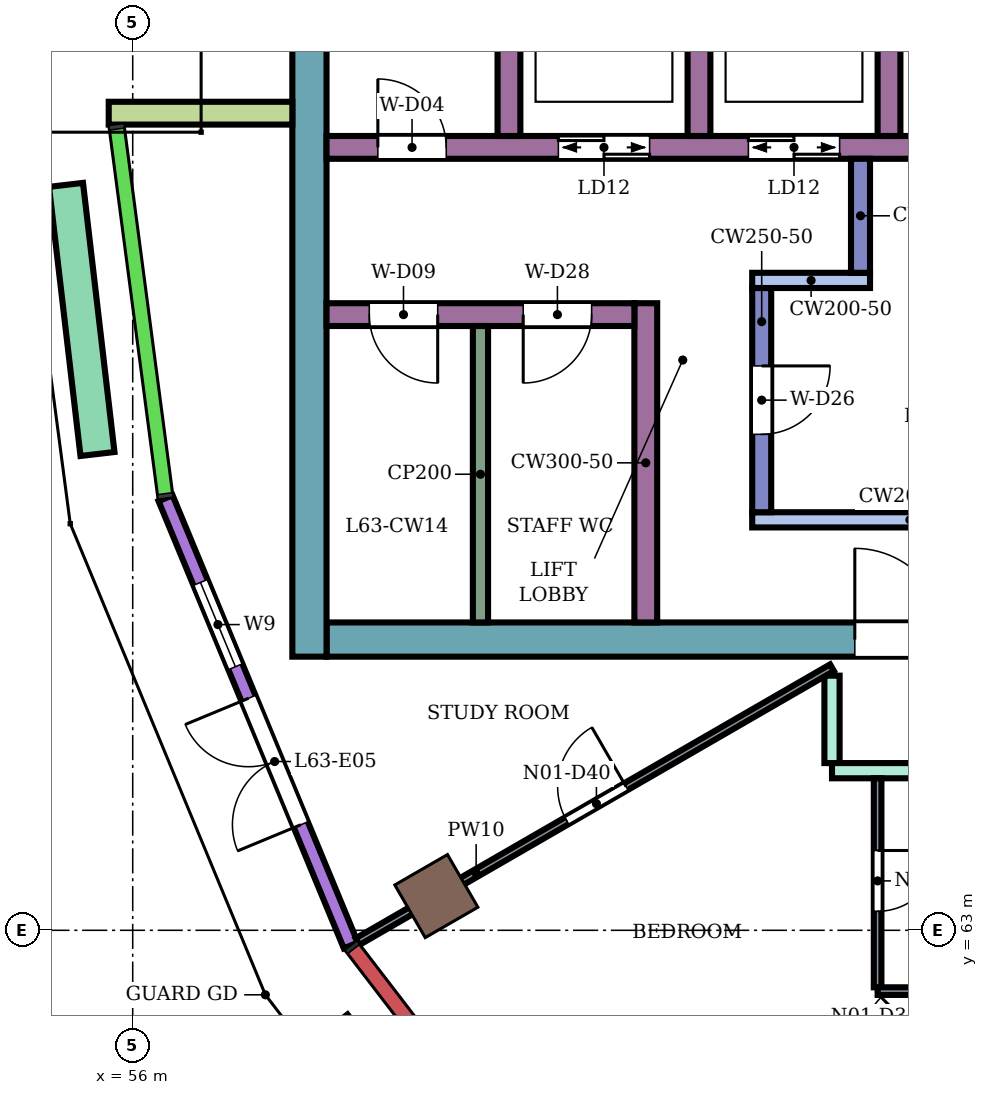
"""IFC4 building model, lengths in metres.
Left out: names, types, materials, properties, quantities, classifications, styles, units other than length and angle.
Written with IfcOpenShell. Run it as: python <this file> out.ifc"""

import sys

from ifc_helpers import new_model, si_unit, direction, frame, frame_2d, origin, origin_2d, place, context, subcontext, project, spatial, rectangle, extrude, element, fill, save


model = new_model("IFC4")
c1 = context("Model", 3, precision=1e-05, world=origin(), true_north=direction((0.0, 1.0)))
c2 = subcontext(c1, "Body", "Model", "MODEL_VIEW")
j1 = project(units=[si_unit("LENGTHUNIT", "METRE"), si_unit("PLANEANGLEUNIT", "RADIAN")], contexts=[c1])
p1 = place(None, origin())
s1 = spatial("IfcSite", under=j1, at=p1, CompositionType="ELEMENT")
p2 = place(p1, origin())
s2 = spatial("IfcBuilding", under=s1, at=p2, CompositionType="ELEMENT")
p3 = place(p2, frame((0.0, 0.0, 275.7)))
s3 = spatial("IfcBuildingStorey", under=s2, at=p3, CompositionType="ELEMENT", Elevation=275.7)
p4 = place(p3, frame((59.995, 63.45, 0.0), z_axis=(0.0, 0.0, 1.0), x_axis=(-0.866025403784, -0.5, 0.0)))
e1 = element("IfcColumn", 1, at=p4, inside=s3, PredefinedType="COLUMN", context=c2, shape_type="SweptSolid", body=[
    extrude(rectangle(XDim=0.8, YDim=0.8, at=origin_2d()), origin(), (0.0, 0.0, 1.0), 4.2),
])
p5 = place(p3, frame((72.1, 66.825, 0.0), z_axis=(0.0, 0.0, 1.0), x_axis=(-1.0, 0.0, 0.0)))
e2 = element("IfcWall", 2, at=p5, inside=s3, PredefinedType="SHEAR", context=c2, shape_type="SweptSolid", body=[
    extrude(rectangle(XDim=13.55, YDim=0.45, at=frame_2d((6.775, 0.0))), origin(), (0.0, 0.0, 1.0), 3.88),
])
p6 = place(p5, frame((4.2, 0.0, 0.0)))
e3 = element("IfcOpeningElement", 3, at=p6, cuts=e2, PredefinedType="OPENING", context=c2, shape_type="SweptSolid", body=[
    extrude(rectangle(XDim=2.4, YDim=2.4, at=frame_2d((1.2, 1.2))), frame((0.0, 0.235, 0.0), z_axis=(0.0, -1.0, 0.0), x_axis=(1.0, 0.0, 0.0)), (0.0, 0.0, 1.0), 0.47),
])
p7 = place(p3, frame((58.325, 83.4, 0.0), z_axis=(0.0, 0.0, 1.0), x_axis=(0.0, -1.0, 0.0)))
e4 = element("IfcWall", 4, at=p7, inside=s3, PredefinedType="SHEAR", context=c2, shape_type="SweptSolid", body=[
    extrude(rectangle(XDim=16.8, YDim=0.45, at=frame_2d((8.4, 0.0))), origin(), (0.0, 0.0, 1.0), 3.88),
])
p8 = place(p3, frame((68.3, 73.3, 0.0), z_axis=(0.0, 0.0, 1.0), x_axis=(-1.0, 0.0, 0.0)))
e5 = element("IfcWall", 5, at=p8, inside=s3, PredefinedType="SHEAR", context=c2, shape_type="SweptSolid", body=[
    extrude(rectangle(XDim=9.75, YDim=0.3, at=frame_2d((4.875, 0.0))), origin(), (0.0, 0.0, 1.0), 3.88),
])
p9 = place(p8, frame((0.55, 0.0, 0.0)))
e6 = element("IfcOpeningElement", 6, at=p9, cuts=e5, PredefinedType="OPENING", context=c2, shape_type="SweptSolid", body=[
    extrude(rectangle(XDim=1.1, YDim=2.1, at=frame_2d((0.55, 1.05))), frame((0.0, 0.16, 0.0), z_axis=(0.0, -1.0, 0.0), x_axis=(1.0, 0.0, 0.0)), (0.0, 0.0, 1.0), 0.32),
])
p10 = place(p8, frame((3.0, 0.0, 0.0)))
e7 = element("IfcOpeningElement", 7, at=p10, cuts=e5, PredefinedType="OPENING", context=c2, shape_type="SweptSolid", body=[
    extrude(rectangle(XDim=1.2, YDim=2.1, at=frame_2d((0.6, 1.05))), frame((0.0, 0.16, 0.0), z_axis=(0.0, -1.0, 0.0), x_axis=(1.0, 0.0, 0.0)), (0.0, 0.0, 1.0), 0.32),
])
p11 = place(p8, frame((5.5, 0.0, 0.0)))
e8 = element("IfcOpeningElement", 8, at=p11, cuts=e5, PredefinedType="OPENING", context=c2, shape_type="SweptSolid", body=[
    extrude(rectangle(XDim=1.2, YDim=2.1, at=frame_2d((0.6, 1.05))), frame((0.0, 0.16, 0.0), z_axis=(0.0, -1.0, 0.0), x_axis=(1.0, 0.0, 0.0)), (0.0, 0.0, 1.0), 0.32),
])
p12 = place(p8, frame((8.175, 0.0, 0.0)))
e9 = element("IfcOpeningElement", 9, at=p12, cuts=e5, PredefinedType="OPENING", context=c2, shape_type="SweptSolid", body=[
    extrude(rectangle(XDim=0.9, YDim=2.1, at=frame_2d((0.45, 1.05))), frame((0.0, 0.16, 0.0), z_axis=(0.0, -1.0, 0.0), x_axis=(1.0, 0.0, 0.0)), (0.0, 0.0, 1.0), 0.32),
])
for number, where, z_axis, x_axis in (
    (10, (65.95, 76.0, 0.0), (0.0, 0.0, 1.0), (0.0, -1.0, 0.0)),
    (11, (63.45, 76.0, 0.0), (0.0, 0.0, 1.0), (0.0, -1.0, 0.0)),
    (12, (60.95, 76.0, 0.0), (0.0, 0.0, 1.0), (0.0, -1.0, 0.0)),
):
    element("IfcWall", number, at=place(p3, frame(where, z_axis=z_axis, x_axis=x_axis)), inside=s3, PredefinedType="SHEAR", context=c2, shape_type="SweptSolid", body=[
        extrude(rectangle(XDim=2.55, YDim=0.3, at=frame_2d((1.275, 0.0))), origin(), (0.0, 0.0, 1.0), 3.88),
    ])
p13 = place(p3, frame((68.3, 68.4, 0.0), z_axis=(0.0, 0.0, 1.0), x_axis=(-1.0, 0.0, 0.0)))
e13 = element("IfcWall", 13, at=p13, inside=s3, PredefinedType="SHEAR", context=c2, shape_type="SweptSolid", body=[
    extrude(rectangle(XDim=4.15, YDim=0.2, at=frame_2d((2.075, 0.0))), origin(), (0.0, 0.0, 1.0), 3.88),
])
p14 = place(p3, frame((64.275, 71.45, 0.0), z_axis=(0.0, 0.0, 1.0), x_axis=(0.0, -1.0, 0.0)))
e14 = element("IfcWall", 14, at=p14, inside=s3, PredefinedType="SHEAR", context=c2, shape_type="SweptSolid", body=[
    extrude(rectangle(XDim=2.95, YDim=0.25, at=frame_2d((1.475, 0.0))), origin(), (0.0, 0.0, 1.0), 3.88),
])
p15 = place(p14, frame((1.025, 0.0, 0.0)))
e15 = element("IfcOpeningElement", 15, at=p15, cuts=e14, PredefinedType="OPENING", context=c2, shape_type="SweptSolid", body=[
    extrude(rectangle(XDim=0.9, YDim=2.1, at=frame_2d((0.45, 1.05))), frame((0.0, 0.135, 0.0), z_axis=(0.0, -1.0, 0.0), x_axis=(1.0, 0.0, 0.0)), (0.0, 0.0, 1.0), 0.27),
])
p16 = place(p3, frame((65.7, 71.55, 0.0), z_axis=(0.0, 0.0, 1.0), x_axis=(-1.0, 0.0, 0.0)))
e16 = element("IfcWall", 16, at=p16, inside=s3, PredefinedType="SHEAR", context=c2, shape_type="SweptSolid", body=[
    extrude(rectangle(XDim=1.55, YDim=0.2, at=frame_2d((0.775, 0.0))), origin(), (0.0, 0.0, 1.0), 3.88),
])
p17 = place(p3, frame((65.575, 73.15, 0.0), z_axis=(0.0, 0.0, 1.0), x_axis=(0.0, -1.0, 0.0)))
e17 = element("IfcWall", 17, at=p17, inside=s3, PredefinedType="SHEAR", context=c2, shape_type="SweptSolid", body=[
    extrude(rectangle(XDim=1.5, YDim=0.25, at=frame_2d((0.75, 0.0))), origin(), (0.0, 0.0, 1.0), 3.88),
])
p18 = place(p3, frame((62.75, 71.25, 0.0), z_axis=(0.0, 0.0, 1.0), x_axis=(0.0, -1.0, 0.0)))
e18 = element("IfcWall", 18, at=p18, inside=s3, PredefinedType="SHEAR", context=c2, shape_type="SweptSolid", body=[
    extrude(rectangle(XDim=4.2, YDim=0.3, at=frame_2d((2.1, 0.0))), origin(), (0.0, 0.0, 1.0), 3.88),
])
p19 = place(p3, frame((62.6, 71.1, 0.0), z_axis=(0.0, 0.0, 1.0), x_axis=(-1.0, 0.0, 0.0)))
e19 = element("IfcWall", 19, at=p19, inside=s3, PredefinedType="SHEAR", context=c2, shape_type="SweptSolid", body=[
    extrude(rectangle(XDim=4.05, YDim=0.3, at=frame_2d((2.025, 0.0))), origin(), (0.0, 0.0, 1.0), 3.88),
])
p20 = place(p19, frame((0.562, 0.0, 0.0)))
e20 = element("IfcOpeningElement", 20, at=p20, cuts=e19, PredefinedType="OPENING", context=c2, shape_type="SweptSolid", body=[
    extrude(rectangle(XDim=0.9, YDim=2.1, at=frame_2d((0.45, 1.05))), frame((0.0, 0.16, 0.0), z_axis=(0.0, -1.0, 0.0), x_axis=(1.0, 0.0, 0.0)), (0.0, 0.0, 1.0), 0.32),
])
p21 = place(p19, frame((2.587, 0.0, 0.0)))
e21 = element("IfcOpeningElement", 21, at=p21, cuts=e19, PredefinedType="OPENING", context=c2, shape_type="SweptSolid", body=[
    extrude(rectangle(XDim=0.9, YDim=2.1, at=frame_2d((0.45, 1.05))), frame((0.0, 0.16, 0.0), z_axis=(0.0, -1.0, 0.0), x_axis=(1.0, 0.0, 0.0)), (0.0, 0.0, 1.0), 0.32),
])
p22 = place(p3, frame((56.432, 68.685, 0.0), z_axis=(0.0, 0.0, 1.0), x_axis=(0.382690319485, -0.923876679743, 0.0)))
e22 = element("IfcWall", 22, at=p22, inside=s3, PredefinedType="NOTDEFINED", context=c2, shape_type="SweptSolid", body=[
    extrude(rectangle(XDim=6.369, YDim=0.2, at=frame_2d((3.185, 0.0))), origin(), (0.0, 0.0, 1.0), 4.2),
])
p23 = place(p22, frame((1.2, 0.0, 0.9)))
e23 = element("IfcOpeningElement", 23, at=p23, cuts=e22, PredefinedType="OPENING", context=c2, shape_type="SweptSolid", body=[
    extrude(rectangle(XDim=1.2, YDim=2.7, at=frame_2d((0.6, 1.35))), frame((0.0, 0.11, 0.0), z_axis=(0.0, -1.0, 0.0), x_axis=(1.0, 0.0, 0.0)), (0.0, 0.0, 1.0), 0.22),
])
p24 = place(p22, frame((2.85, 0.0, 0.0)))
e24 = element("IfcOpeningElement", 24, at=p24, cuts=e22, PredefinedType="OPENING", context=c2, shape_type="SweptSolid", body=[
    extrude(rectangle(XDim=1.8, YDim=2.7, at=frame_2d((0.9, 1.35))), frame((0.0, 0.11, 0.0), z_axis=(0.0, -1.0, 0.0), x_axis=(1.0, 0.0, 0.0)), (0.0, 0.0, 1.0), 0.22),
])
p25 = place(p3, frame((58.1, 73.75, 0.0), z_axis=(0.0, 0.0, 1.0), x_axis=(-1.0, 0.0, 0.0)))
e25 = element("IfcWall", 25, at=p25, inside=s3, PredefinedType="NOTDEFINED", context=c2, shape_type="SweptSolid", body=[
    extrude(rectangle(XDim=2.416, YDim=0.3, at=frame_2d((1.208, 0.0))), origin(), (0.0, 0.0, 1.0), 4.2),
])
p26 = place(p3, frame((55.123, 72.807, 0.0), z_axis=(0.0, 0.0, 1.0), x_axis=(0.116149828965, -0.993231703698, 0.0)))
e26 = element("IfcWall", 26, at=p26, inside=s3, PredefinedType="USERDEFINED", context=c2, shape_type="SweptSolid", body=[
    extrude(rectangle(XDim=3.565, YDim=0.45, at=frame_2d((1.782, 0.0))), origin(), (0.0, 0.0, 1.0), 0.6),
])
p27 = place(p3, frame((58.647, 61.756, 0.0), z_axis=(0.0, 0.0, 1.0), x_axis=(0.608768756855, -0.793347717383, 0.0)))
e27 = element("IfcWall", 27, at=p27, inside=s3, PredefinedType="USERDEFINED", context=c2, shape_type="SweptSolid", body=[
    extrude(rectangle(XDim=3.571, YDim=0.45, at=frame_2d((1.786, 0.0))), origin(), (0.0, 0.0, 1.0), 0.6),
])
p28 = place(p3, frame((65.2, 65.2, 0.0), z_axis=(0.0, 0.0, 1.0), x_axis=(0.0, 1.0, 0.0)))
e28 = element("IfcWall", 28, at=p28, inside=s3, PredefinedType="PARTITIONING", context=c2, shape_type="SweptSolid", body=[
    extrude(rectangle(XDim=1.15, YDim=0.2, at=frame_2d((0.575, 0.0))), origin(), (0.0, 0.0, 1.0), 3.75),
])
p29 = place(p3, frame((65.2, 65.1, 0.0), z_axis=(0.0, 0.0, 1.0), x_axis=(1.0, 0.0, 0.0)))
e29 = element("IfcWall", 29, at=p29, inside=s3, PredefinedType="PARTITIONING", context=c2, shape_type="SweptSolid", body=[
    extrude(rectangle(XDim=2.98, YDim=0.2, at=frame_2d((1.49, 0.0))), origin(), (0.0, 0.0, 1.0), 3.75),
])
p30 = place(p3, frame((58.958, 62.851, 0.0), z_axis=(0.0, 0.0, 1.0), x_axis=(0.866044015472, 0.499967762227, 0.0)))
e30 = element("IfcWall", 30, at=p30, inside=s3, PredefinedType="PARTITIONING", context=c2, shape_type="SweptSolid", body=[
    extrude(rectangle(XDim=7.208, YDim=0.1, at=frame_2d((3.604, 0.0))), origin(), (0.0, 0.0, 1.0), 3.75),
])
p31 = place(p30, frame((3.179, 0.0, 0.0)))
e31 = element("IfcOpeningElement", 31, at=p31, cuts=e30, PredefinedType="OPENING", context=c2, shape_type="SweptSolid", body=[
    extrude(rectangle(XDim=0.9, YDim=2.1, at=frame_2d((0.45, 1.05))), frame((0.0, 0.06, 0.0), z_axis=(0.0, -1.0, 0.0), x_axis=(1.0, 0.0, 0.0)), (0.0, 0.0, 1.0), 0.12),
])
p32 = place(p3, frame((64.656, 59.656, 0.0), z_axis=(0.0, 0.0, 1.0), x_axis=(0.707106781187, 0.707106781187, 0.0)))
e32 = element("IfcWall", 32, at=p32, inside=s3, PredefinedType="PARTITIONING", context=c2, shape_type="SweptSolid", body=[
    extrude(rectangle(XDim=7.22, YDim=0.1, at=frame_2d((3.61, 0.0))), origin(), (0.0, 0.0, 1.0), 3.75),
])
p33 = place(p32, frame((1.684, 0.0, 0.0)))
e33 = element("IfcOpeningElement", 33, at=p33, cuts=e32, PredefinedType="OPENING", context=c2, shape_type="SweptSolid", body=[
    extrude(rectangle(XDim=0.9, YDim=2.1, at=frame_2d((0.45, 1.05))), frame((0.0, 0.06, 0.0), z_axis=(0.0, -1.0, 0.0), x_axis=(1.0, 0.0, 0.0)), (0.0, 0.0, 1.0), 0.12),
])
p34 = place(p3, frame((65.8, 62.25, 0.0), z_axis=(0.0, 0.0, 1.0), x_axis=(0.0, 1.0, 0.0)))
e34 = element("IfcWall", 34, at=p34, inside=s3, PredefinedType="PARTITIONING", context=c2, shape_type="SweptSolid", body=[
    extrude(rectangle(XDim=2.75, YDim=0.1, at=frame_2d((1.375, 0.0))), origin(), (0.0, 0.0, 1.0), 3.75),
])
p35 = place(p34, frame((1.0, 0.0, 0.0)))
e35 = element("IfcOpeningElement", 35, at=p35, cuts=e34, PredefinedType="OPENING", context=c2, shape_type="SweptSolid", body=[
    extrude(rectangle(XDim=0.8, YDim=2.1, at=frame_2d((0.4, 1.05))), frame((0.0, 0.06, 0.0), z_axis=(0.0, -1.0, 0.0), x_axis=(1.0, 0.0, 0.0)), (0.0, 0.0, 1.0), 0.12),
])
p36 = place(p3, frame((65.8, 62.2, 0.0), z_axis=(0.0, 0.0, 1.0), x_axis=(1.0, 0.0, 0.0)))
e36 = element("IfcWall", 36, at=p36, inside=s3, PredefinedType="PARTITIONING", context=c2, shape_type="SweptSolid", body=[
    extrude(rectangle(XDim=1.29, YDim=0.1, at=frame_2d((0.645, 0.0))), origin(), (0.0, 0.0, 1.0), 3.75),
])
p37 = place(p3, frame((60.575, 70.95, 0.0), z_axis=(0.0, 0.0, 1.0), x_axis=(0.0, -1.0, 0.0)))
e37 = element("IfcWall", 37, at=p37, inside=s3, PredefinedType="PARTITIONING", context=c2, shape_type="SweptSolid", body=[
    extrude(rectangle(XDim=3.9, YDim=0.2, at=frame_2d((1.95, 0.0))), origin(), (0.0, 0.0, 1.0), 3.88),
])
p38 = place(p23, origin())
e38 = element("IfcWindow", 38, at=p38, inside=s3, PartitioningType="SINGLE_PANEL", PredefinedType="WINDOW", context=c2, shape_type="SweptSolid", body=[
    extrude(rectangle(XDim=1.2, YDim=2.7, at=frame_2d((0.6, 1.35))), frame((0.0, 0.03, 0.0), z_axis=(0.0, -1.0, 0.0), x_axis=(1.0, 0.0, 0.0)), (0.0, 0.0, 1.0), 0.06),
])
fill(e23, e38)
p39 = place(p24, frame((1.8, 0.0, 0.0), z_axis=(0.0, 0.0, 1.0), x_axis=(-1.0, 0.0, 0.0)))
e39 = element("IfcDoor", 39, at=p39, inside=s3, OperationType="DOUBLE_DOOR_SINGLE_SWING", PredefinedType="DOOR", context=c2, shape_type="SweptSolid", body=[
    extrude(rectangle(XDim=1.8, YDim=2.7, at=frame_2d((0.9, 1.35))), frame((0.0, 0.025, 0.0), z_axis=(0.0, -1.0, 0.0), x_axis=(1.0, 0.0, 0.0)), (0.0, 0.0, 1.0), 0.05),
])
fill(e24, e39)
p40 = place(p35, frame((0.8, 0.0, 0.0), z_axis=(0.0, 0.0, 1.0), x_axis=(-1.0, 0.0, 0.0)))
e40 = element("IfcDoor", 40, at=p40, inside=s3, OperationType="SINGLE_SWING_LEFT", PredefinedType="DOOR", context=c2, shape_type="SweptSolid", body=[
    extrude(rectangle(XDim=0.8, YDim=2.1, at=frame_2d((0.4, 1.05))), frame((0.0, 0.025, 0.0), z_axis=(0.0, -1.0, 0.0), x_axis=(1.0, 0.0, 0.0)), (0.0, 0.0, 1.0), 0.05),
])
fill(e35, e40)
p41 = place(p31, origin())
e41 = element("IfcDoor", 41, at=p41, inside=s3, OperationType="SINGLE_SWING_RIGHT", PredefinedType="DOOR", context=c2, shape_type="SweptSolid", body=[
    extrude(rectangle(XDim=0.9, YDim=2.1, at=frame_2d((0.45, 1.05))), frame((0.0, 0.025, 0.0), z_axis=(0.0, -1.0, 0.0), x_axis=(1.0, 0.0, 0.0)), (0.0, 0.0, 1.0), 0.05),
])
fill(e31, e41)
p42 = place(p10, origin())
e42 = element("IfcDoor", 42, at=p42, inside=s3, OperationType="DOUBLE_DOOR_SLIDING", PredefinedType="DOOR", context=c2, shape_type="SweptSolid", body=[
    extrude(rectangle(XDim=1.2, YDim=2.1, at=frame_2d((0.6, 1.05))), frame((0.0, 0.025, 0.0), z_axis=(0.0, -1.0, 0.0), x_axis=(1.0, 0.0, 0.0)), (0.0, 0.0, 1.0), 0.05),
])
fill(e7, e42)
p43 = place(p11, origin())
e43 = element("IfcDoor", 43, at=p43, inside=s3, OperationType="DOUBLE_DOOR_SLIDING", PredefinedType="DOOR", context=c2, shape_type="SweptSolid", body=[
    extrude(rectangle(XDim=1.2, YDim=2.1, at=frame_2d((0.6, 1.05))), frame((0.0, 0.025, 0.0), z_axis=(0.0, -1.0, 0.0), x_axis=(1.0, 0.0, 0.0)), (0.0, 0.0, 1.0), 0.05),
])
fill(e8, e43)
p44 = place(p12, frame((0.9, 0.0, 0.0), z_axis=(0.0, 0.0, 1.0), x_axis=(-1.0, 0.0, 0.0)))
e44 = element("IfcDoor", 44, at=p44, inside=s3, OperationType="SINGLE_SWING_LEFT", PredefinedType="DOOR", context=c2, shape_type="SweptSolid", body=[
    extrude(rectangle(XDim=0.9, YDim=2.1, at=frame_2d((0.45, 1.05))), frame((0.0, 0.025, 0.0), z_axis=(0.0, -1.0, 0.0), x_axis=(1.0, 0.0, 0.0)), (0.0, 0.0, 1.0), 0.05),
])
fill(e9, e44)
p45 = place(p15, origin())
e45 = element("IfcDoor", 45, at=p45, inside=s3, OperationType="SINGLE_SWING_LEFT", PredefinedType="DOOR", context=c2, shape_type="SweptSolid", body=[
    extrude(rectangle(XDim=0.9, YDim=2.1, at=frame_2d((0.45, 1.05))), frame((0.0, 0.025, 0.0), z_axis=(0.0, -1.0, 0.0), x_axis=(1.0, 0.0, 0.0)), (0.0, 0.0, 1.0), 0.05),
])
fill(e15, e45)
p46 = place(p20, origin())
e46 = element("IfcDoor", 46, at=p46, inside=s3, OperationType="SINGLE_SWING_RIGHT", PredefinedType="DOOR", context=c2, shape_type="SweptSolid", body=[
    extrude(rectangle(XDim=0.9, YDim=2.1, at=frame_2d((0.45, 1.05))), frame((0.0, 0.025, 0.0), z_axis=(0.0, -1.0, 0.0), x_axis=(1.0, 0.0, 0.0)), (0.0, 0.0, 1.0), 0.05),
])
fill(e20, e46)
p47 = place(p21, origin())
e47 = element("IfcDoor", 47, at=p47, inside=s3, OperationType="SINGLE_SWING_LEFT", PredefinedType="DOOR", context=c2, shape_type="SweptSolid", body=[
    extrude(rectangle(XDim=0.9, YDim=2.1, at=frame_2d((0.45, 1.05))), frame((0.0, 0.025, 0.0), z_axis=(0.0, -1.0, 0.0), x_axis=(1.0, 0.0, 0.0)), (0.0, 0.0, 1.0), 0.05),
])
fill(e21, e47)
p48 = place(p6, frame((2.4, 0.0, 0.0), z_axis=(0.0, 0.0, 1.0), x_axis=(-1.0, 0.0, 0.0)))
e48 = element("IfcDoor", 48, at=p48, inside=s3, OperationType="DOUBLE_DOOR_SINGLE_SWING", PredefinedType="DOOR", context=c2, shape_type="SweptSolid", body=[
    extrude(rectangle(XDim=2.4, YDim=2.4, at=frame_2d((1.2, 1.2))), frame((0.0, 0.025, 0.0), z_axis=(0.0, -1.0, 0.0), x_axis=(1.0, 0.0, 0.0)), (0.0, 0.0, 1.0), 0.05),
])
fill(e3, e48)
save(model, sys.argv[1])
